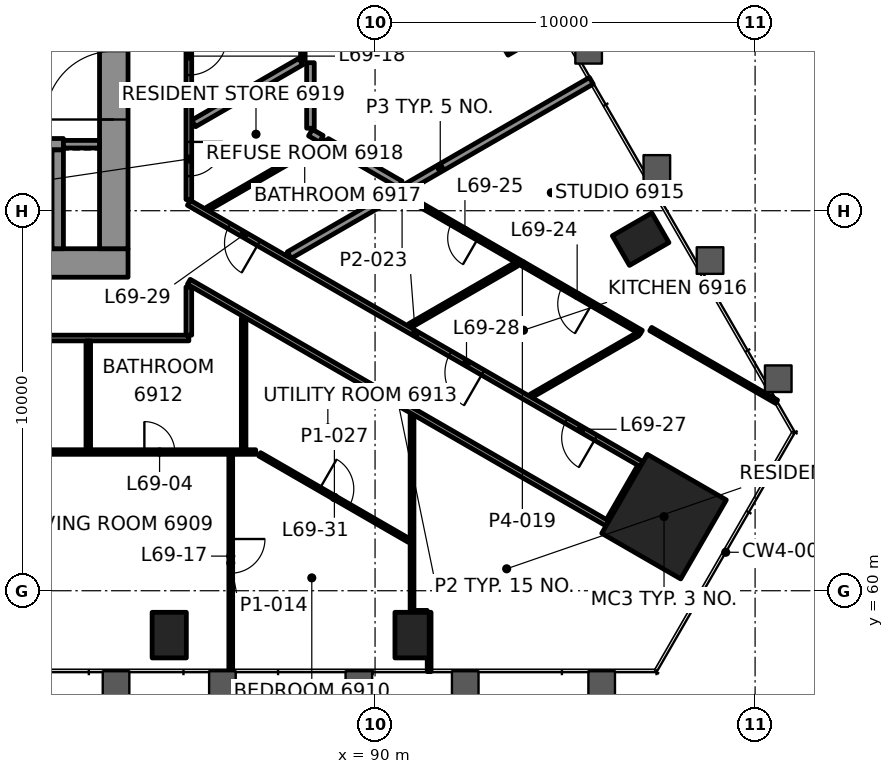
"""IFC4 building model, lengths in metres.
Left out: names, types, materials, properties, quantities, classifications, styles, units other than length and angle.
Written with IfcOpenShell. Run it as: python <this file> out.ifc"""

import sys

from ifc_helpers import new_model, si_unit, direction, frame, frame_2d, origin, origin_2d, place, context, subcontext, project, spatial, rectangle, hollow_rectangle, extrude, element, fill, save


model = new_model("IFC4")
c1 = context("Model", 3, precision=1e-05, world=origin(), true_north=direction((0.0, 1.0)))
c2 = subcontext(c1, "Body", "Model", "MODEL_VIEW")
j1 = project(units=[si_unit("LENGTHUNIT", "METRE"), si_unit("PLANEANGLEUNIT", "RADIAN")], contexts=[c1])
p1 = place(None, origin())
s1 = spatial("IfcSite", under=j1, at=p1, CompositionType="ELEMENT")
p2 = place(p1, origin())
s2 = spatial("IfcBuilding", under=s1, at=p2, CompositionType="ELEMENT")
p3 = place(p2, frame((0.0, 0.0, 288.1)))
s3 = spatial("IfcBuildingStorey", under=s2, at=p3, CompositionType="ELEMENT", Elevation=288.1)
p4 = place(p3, frame((97.604, 61.95, 0.0), z_axis=(0.0, 0.0, 1.0), x_axis=(0.5, 0.866025403784, 0.0)))
e1 = element("IfcColumn", 1, at=p4, inside=s3, PredefinedType="COLUMN", context=c2, shape_type="SweptSolid", body=[
    extrude(rectangle(XDim=2.4, YDim=2.4, at=origin_2d()), origin(), (0.0, 0.0, 1.0), 3.5),
])
for number, where, z_axis, x_axis in (
    (2, (84.584, 58.832, -0.0), (0.0, 0.0, 1.0), (1.0, 0.0, 0.0)),
    (3, (90.973, 58.832, -0.0), (0.0, 0.0, 1.0), (1.0, 0.0, 0.0)),
    (4, (96.989, 69.251, -0.0), (0.0, 0.0, 1.0), (-0.5, 0.866, 0.0)),
    (5, (93.794, 74.784, -0.0), (0.0, 0.0, 1.0), (-0.5, 0.866, 0.0)),
):
    element("IfcColumn", number, at=place(p3, frame(where, z_axis=z_axis, x_axis=x_axis)), inside=s3, PredefinedType="COLUMN", context=c2, shape_type="SweptSolid", body=[
        extrude(hollow_rectangle(XDim=0.9, YDim=1.2, WallThickness=0.06, at=origin_2d()), origin(), (0.0, 0.0, 1.0), 3.5),
    ])
p5 = place(p3, frame((66.5, 68.625, 0.0), z_axis=(0.0, 0.0, 1.0), x_axis=(1.0, 0.0, 0.0)))
e6 = element("IfcWall", 6, at=p5, inside=s3, PredefinedType="SHEAR", context=c2, shape_type="SweptSolid", body=[
    extrude(rectangle(XDim=17.0, YDim=0.75, at=frame_2d((8.5, 0.0))), origin(), (0.0, 0.0, 1.0), 3.3),
])
p6 = place(p5, frame((2.7, 0.0, 0.0)))
e7 = element("IfcOpeningElement", 7, at=p6, cuts=e6, PredefinedType="OPENING", context=c2, shape_type="SweptSolid", body=[
    extrude(rectangle(XDim=0.9, YDim=2.1, at=frame_2d((0.45, 1.05))), frame((0.0, 0.385, 0.0), z_axis=(0.0, -1.0, 0.0), x_axis=(1.0, 0.0, 0.0)), (0.0, 0.0, 1.0), 0.77),
])
p7 = place(p3, frame((83.125, 69.0, 0.0), z_axis=(0.0, 0.0, 1.0), x_axis=(0.0, 1.0, 0.0)))
e8 = element("IfcWall", 8, at=p7, inside=s3, PredefinedType="SHEAR", context=c2, shape_type="SweptSolid", body=[
    extrude(rectangle(XDim=12.0, YDim=0.75, at=frame_2d((6.0, 0.0))), origin(), (0.0, 0.0, 1.0), 3.3),
])
p8 = place(p7, frame((3.4, 0.0, 0.0)))
e9 = element("IfcOpeningElement", 9, at=p8, cuts=e8, PredefinedType="OPENING", context=c2, shape_type="SweptSolid", body=[
    extrude(rectangle(XDim=1.8, YDim=2.1, at=frame_2d((0.9, 1.05))), frame((0.0, 0.385, 0.0), z_axis=(0.0, -1.0, 0.0), x_axis=(1.0, 0.0, 0.0)), (0.0, 0.0, 1.0), 0.77),
])
p9 = place(p3, frame((70.3, 71.75, 0.0), z_axis=(0.0, 0.0, 1.0), x_axis=(1.0, 0.0, 0.0)))
e10 = element("IfcWall", 10, at=p9, inside=s3, PredefinedType="SHEAR", context=c2, shape_type="SweptSolid", body=[
    extrude(rectangle(XDim=11.5, YDim=0.3, at=frame_2d((5.75, 0.0))), origin(), (0.0, 0.0, 1.0), 3.3),
])
p10 = place(p9, frame((1.0, 0.0, 0.0)))
e11 = element("IfcOpeningElement", 11, at=p10, cuts=e10, PredefinedType="OPENING", context=c2, shape_type="SweptSolid", body=[
    extrude(rectangle(XDim=1.1, YDim=2.1, at=frame_2d((0.55, 1.05))), frame((0.0, 0.16, 0.0), z_axis=(0.0, -1.0, 0.0), x_axis=(1.0, 0.0, 0.0)), (0.0, 0.0, 1.0), 0.32),
])
p11 = place(p9, frame((3.8, 0.0, 0.0)))
e12 = element("IfcOpeningElement", 12, at=p11, cuts=e10, PredefinedType="OPENING", context=c2, shape_type="SweptSolid", body=[
    extrude(rectangle(XDim=1.1, YDim=2.1, at=frame_2d((0.55, 1.05))), frame((0.0, 0.16, 0.0), z_axis=(0.0, -1.0, 0.0), x_axis=(1.0, 0.0, 0.0)), (0.0, 0.0, 1.0), 0.32),
])
p12 = place(p9, frame((6.6, 0.0, 0.0)))
e13 = element("IfcOpeningElement", 13, at=p12, cuts=e10, PredefinedType="OPENING", context=c2, shape_type="SweptSolid", body=[
    extrude(rectangle(XDim=1.1, YDim=2.1, at=frame_2d((0.55, 1.05))), frame((0.0, 0.16, 0.0), z_axis=(0.0, -1.0, 0.0), x_axis=(1.0, 0.0, 0.0)), (0.0, 0.0, 1.0), 0.32),
])
p13 = place(p9, frame((9.4, 0.0, 0.0)))
e14 = element("IfcOpeningElement", 14, at=p13, cuts=e10, PredefinedType="OPENING", context=c2, shape_type="SweptSolid", body=[
    extrude(rectangle(XDim=1.1, YDim=2.1, at=frame_2d((0.55, 1.05))), frame((0.0, 0.16, 0.0), z_axis=(0.0, -1.0, 0.0), x_axis=(1.0, 0.0, 0.0)), (0.0, 0.0, 1.0), 0.32),
])
p14 = place(p3, frame((81.65, 69.0, 0.0), z_axis=(0.0, 0.0, 1.0), x_axis=(0.0, 1.0, 0.0)))
e15 = element("IfcWall", 15, at=p14, inside=s3, PredefinedType="SHEAR", context=c2, shape_type="SweptSolid", body=[
    extrude(rectangle(XDim=2.6, YDim=0.3, at=frame_2d((1.3, 0.0))), origin(), (0.0, 0.0, 1.0), 3.3),
])
p15 = place(p3, frame((91.023, 59.432, 0.0), z_axis=(0.0, 0.0, 1.0), x_axis=(1.0, 0.0, 0.0)))
e16 = element("IfcWall", 16, at=p15, inside=s3, PredefinedType="PARTITIONING", context=c2, shape_type="SweptSolid", body=[
    extrude(rectangle(XDim=0.349, YDim=0.1, at=frame_2d((0.175, 0.0))), origin(), (0.0, 0.0, 1.0), 2.7),
])
p16 = place(p3, frame((73.935, 63.65, 0.0), z_axis=(0.0, 0.0, 1.0), x_axis=(1.0, 0.0, 0.0)))
e17 = element("IfcWall", 17, at=p16, inside=s3, PredefinedType="PARTITIONING", context=c2, shape_type="SweptSolid", body=[
    extrude(rectangle(XDim=12.924, YDim=0.12, at=frame_2d((6.462, 0.0))), origin(), (0.0, 0.0, 1.0), 2.7),
])
p17 = place(p16, frame((6.197, 0.0, 0.0)))
e18 = element("IfcOpeningElement", 18, at=p17, cuts=e17, PredefinedType="OPENING", context=c2, shape_type="SweptSolid", body=[
    extrude(rectangle(XDim=0.9, YDim=2.1, at=frame_2d((0.45, 1.05))), frame((0.0, 0.07, 0.0), z_axis=(0.0, -1.0, 0.0), x_axis=(1.0, 0.0, 0.0)), (0.0, 0.0, 1.0), 0.14),
])
p18 = place(p16, frame((9.995, 0.0, 0.0)))
e19 = element("IfcOpeningElement", 19, at=p18, cuts=e17, PredefinedType="OPENING", context=c2, shape_type="SweptSolid", body=[
    extrude(rectangle(XDim=0.8, YDim=2.1, at=frame_2d((0.4, 1.05))), frame((0.0, 0.07, 0.0), z_axis=(0.0, -1.0, 0.0), x_axis=(1.0, 0.0, 0.0)), (0.0, 0.0, 1.0), 0.14),
])
p19 = place(p3, frame((85.1, 66.65, 0.0), z_axis=(0.0, 0.0, 1.0), x_axis=(-1.0, 0.0, 0.0)))
e20 = element("IfcWall", 20, at=p19, inside=s3, PredefinedType="PARTITIONING", context=c2, shape_type="SweptSolid", body=[
    extrude(rectangle(XDim=20.2, YDim=0.15, at=frame_2d((10.1, 0.0))), origin(), (0.0, 0.0, 1.0), 2.7),
])
p20 = place(p19, frame((6.405, 0.0, 0.0)))
e21 = element("IfcOpeningElement", 21, at=p20, cuts=e20, PredefinedType="OPENING", context=c2, shape_type="SweptSolid", body=[
    extrude(rectangle(XDim=1.0, YDim=2.1, at=frame_2d((0.5, 1.05))), frame((0.0, 0.085, 0.0), z_axis=(0.0, -1.0, 0.0), x_axis=(1.0, 0.0, 0.0)), (0.0, 0.0, 1.0), 0.17),
])
p21 = place(p19, frame((12.845, 0.0, 0.0)))
e22 = element("IfcOpeningElement", 22, at=p21, cuts=e20, PredefinedType="OPENING", context=c2, shape_type="SweptSolid", body=[
    extrude(rectangle(XDim=0.9, YDim=2.1, at=frame_2d((0.45, 1.05))), frame((0.0, 0.085, 0.0), z_axis=(0.0, -1.0, 0.0), x_axis=(1.0, 0.0, 0.0)), (0.0, 0.0, 1.0), 0.17),
])
p22 = place(p3, frame((94.104, 65.126, 0.0), z_axis=(0.0, 0.0, 1.0), x_axis=(0.866000336211, 0.500043415797, 0.0)))
e23 = element("IfcWall", 23, at=p22, inside=s3, PredefinedType="PARTITIONING", context=c2, shape_type="SweptSolid", body=[
    extrude(rectangle(XDim=3.248, YDim=0.1, at=frame_2d((1.624, 0.0))), origin(), (0.0, 0.0, 1.0), 2.7),
])
p23 = place(p3, frame((90.918, 66.975, 0.0), z_axis=(0.0, 0.0, 1.0), x_axis=(0.86605210011, 0.499953757757, 0.0)))
e24 = element("IfcWall", 24, at=p23, inside=s3, PredefinedType="PARTITIONING", context=c2, shape_type="SweptSolid", body=[
    extrude(rectangle(XDim=3.228, YDim=0.12, at=frame_2d((1.614, 0.0))), origin(), (0.0, 0.0, 1.0), 2.7),
])
p24 = place(p3, frame((87.741, 68.83, 0.0), z_axis=(0.0, 0.0, 1.0), x_axis=(0.866026579827, 0.499997963029, 0.0)))
e25 = element("IfcWall", 25, at=p24, inside=s3, PredefinedType="PARTITIONING", context=c2, shape_type="SweptSolid", body=[
    extrude(rectangle(XDim=9.179, YDim=0.2, at=frame_2d((4.59, 0.0))), origin(), (0.0, 0.0, 1.0), 2.688),
])
p25 = place(p3, frame((85.585, 70.045, 0.0), z_axis=(0.0, 0.0, 1.0), x_axis=(0.866004928679, 0.500035462246, 0.0)))
e26 = element("IfcWall", 26, at=p25, inside=s3, PredefinedType="PARTITIONING", context=c2, shape_type="SweptSolid", body=[
    extrude(rectangle(XDim=3.578, YDim=0.1, at=frame_2d((1.789, 0.0))), origin(), (0.0, 0.0, 1.0), 2.7),
])
p26 = place(p3, frame((85.227, 72.297, 0.0), z_axis=(0.0, 0.0, 1.0), x_axis=(0.866002113569, 0.500040337666, 0.0)))
e27 = element("IfcWall", 27, at=p26, inside=s3, PredefinedType="PARTITIONING", context=c2, shape_type="SweptSolid", body=[
    extrude(rectangle(XDim=3.258, YDim=0.2, at=frame_2d((1.629, 0.0))), origin(), (0.0, 0.0, 1.0), 2.7),
])
p27 = place(p3, frame((96.153, 61.835, 0.0), z_axis=(0.0, 0.0, 1.0), x_axis=(0.500008692254, 0.866020385251, 0.0)))
e28 = element("IfcWall", 28, at=p27, inside=s3, PredefinedType="PARTITIONING", context=c2, shape_type="SweptSolid", body=[
    extrude(rectangle(XDim=1.649, YDim=0.15, at=frame_2d((0.824, 0.0))), origin(), (0.0, 0.0, 1.0), 2.547),
])
p28 = place(p3, frame((91.423, 57.872, 0.0), z_axis=(0.0, 0.0, 1.0), x_axis=(0.0, 1.0, 0.0)))
e29 = element("IfcWall", 29, at=p28, inside=s3, PredefinedType="PARTITIONING", context=c2, shape_type="SweptSolid", body=[
    extrude(rectangle(XDim=1.559, YDim=0.1, at=frame_2d((0.78, 0.0))), origin(), (0.0, 0.0, 1.0), 2.7),
])
p29 = place(p3, frame((90.973, 59.432, 0.0), z_axis=(0.0, 0.0, 1.0), x_axis=(0.0, 1.0, 0.0)))
e30 = element("IfcWall", 30, at=p29, inside=s3, PredefinedType="PARTITIONING", context=c2, shape_type="SweptSolid", body=[
    extrude(rectangle(XDim=5.19, YDim=0.1, at=frame_2d((2.595, 0.0))), origin(), (0.0, 0.0, 1.0), 2.7),
])
p30 = place(p3, frame((88.3, 72.171, 0.0), z_axis=(0.0, 0.0, 1.0), x_axis=(0.0, 1.0, 0.0)))
e31 = element("IfcWall", 31, at=p30, inside=s3, PredefinedType="PARTITIONING", context=c2, shape_type="SweptSolid", body=[
    extrude(rectangle(XDim=1.724, YDim=0.2, at=frame_2d((0.862, 0.0))), origin(), (0.0, 0.0, 1.0), 2.7),
])
p31 = place(p3, frame((88.1, 81.334, 0.0), z_axis=(0.0, 0.0, 1.0), x_axis=(0.0, -1.0, 0.0)))
e32 = element("IfcWall", 32, at=p31, inside=s3, PredefinedType="PARTITIONING", context=c2, shape_type="SweptSolid", body=[
    extrude(rectangle(XDim=7.378, YDim=0.12, at=frame_2d((3.689, 0.0))), origin(), (0.0, 0.0, 1.0), 2.7),
])
p32 = place(p31, frame((4.982, 0.0, 0.0)))
e33 = element("IfcOpeningElement", 33, at=p32, cuts=e32, PredefinedType="OPENING", context=c2, shape_type="SweptSolid", body=[
    extrude(rectangle(XDim=0.9, YDim=2.1, at=frame_2d((0.45, 1.05))), frame((0.0, 0.07, 0.0), z_axis=(0.0, -1.0, 0.0), x_axis=(1.0, 0.0, 0.0)), (0.0, 0.0, 1.0), 0.14),
])
p33 = place(p3, frame((86.542, 63.71, 0.0), z_axis=(0.0, 0.0, 1.0), x_axis=(0.0, 1.0, 0.0)))
e34 = element("IfcWall", 34, at=p33, inside=s3, PredefinedType="PARTITIONING", context=c2, shape_type="SweptSolid", body=[
    extrude(rectangle(XDim=3.46, YDim=0.12, at=frame_2d((1.73, 0.0))), origin(), (0.0, 0.0, 1.0), 2.547),
])
p34 = place(p3, frame((86.203, 63.59, 0.0), z_axis=(0.0, 0.0, 1.0), x_axis=(0.0, -1.0, 0.0)))
e35 = element("IfcWall", 35, at=p34, inside=s3, PredefinedType="PARTITIONING", context=c2, shape_type="SweptSolid", body=[
    extrude(rectangle(XDim=5.718, YDim=0.1, at=frame_2d((2.859, 0.0))), origin(), (0.0, 0.0, 1.0), 2.7),
])
p35 = place(p34, frame((2.229, 0.0, 0.0)))
e36 = element("IfcOpeningElement", 36, at=p35, cuts=e35, PredefinedType="OPENING", context=c2, shape_type="SweptSolid", body=[
    extrude(rectangle(XDim=0.9, YDim=2.1, at=frame_2d((0.45, 1.05))), frame((0.0, 0.06, 0.0), z_axis=(0.0, -1.0, 0.0), x_axis=(1.0, 0.0, 0.0)), (0.0, 0.0, 1.0), 0.12),
])
p36 = place(p3, frame((85.1, 66.725, 0.0), z_axis=(0.0, 0.0, 1.0), x_axis=(0.0, 1.0, 0.0)))
e37 = element("IfcWall", 37, at=p36, inside=s3, PredefinedType="PARTITIONING", context=c2, shape_type="SweptSolid", body=[
    extrude(rectangle(XDim=1.268, YDim=0.15, at=frame_2d((0.634, 0.0))), origin(), (0.0, 0.0, 1.0), 2.547),
])
p37 = place(p3, frame((85.1, 83.348, 0.0), z_axis=(0.0, 0.0, 1.0), x_axis=(0.0, -1.0, 0.0)))
e38 = element("IfcWall", 38, at=p37, inside=s3, PredefinedType="PARTITIONING", context=c2, shape_type="SweptSolid", body=[
    extrude(rectangle(XDim=13.053, YDim=0.15, at=frame_2d((6.527, 0.0))), origin(), (0.0, 0.0, 1.0), 2.7),
])
p38 = place(p37, frame((8.78, 0.0, 0.0)))
e39 = element("IfcOpeningElement", 39, at=p38, cuts=e38, PredefinedType="OPENING", context=c2, shape_type="SweptSolid", body=[
    extrude(rectangle(XDim=1.0, YDim=2.1, at=frame_2d((0.5, 1.05))), frame((0.0, 0.085, 0.0), z_axis=(0.0, -1.0, 0.0), x_axis=(1.0, 0.0, 0.0)), (0.0, 0.0, 1.0), 0.17),
])
p39 = place(p37, frame((11.537, 0.0, 0.0)))
e40 = element("IfcOpeningElement", 40, at=p39, cuts=e38, PredefinedType="OPENING", context=c2, shape_type="SweptSolid", body=[
    extrude(rectangle(XDim=0.9, YDim=2.1, at=frame_2d((0.45, 1.05))), frame((0.0, 0.085, 0.0), z_axis=(0.0, -1.0, 0.0), x_axis=(1.0, 0.0, 0.0)), (0.0, 0.0, 1.0), 0.17),
])
p40 = place(p3, frame((82.454, 63.71, 0.0), z_axis=(0.0, 0.0, 1.0), x_axis=(0.0, 1.0, 0.0)))
e41 = element("IfcWall", 41, at=p40, inside=s3, PredefinedType="PARTITIONING", context=c2, shape_type="SweptSolid", body=[
    extrude(rectangle(XDim=2.865, YDim=0.12, at=frame_2d((1.433, 0.0))), origin(), (0.0, 0.0, 1.0), 2.7),
])
p41 = place(p3, frame((100.566, 64.974, 0.0), z_axis=(0.0, 0.0, 1.0), x_axis=(-0.8660389038, 0.499976616558, 0.0)))
e42 = element("IfcWall", 42, at=p41, inside=s3, PredefinedType="PARTITIONING", context=c2, shape_type="SweptSolid", body=[
    extrude(rectangle(XDim=3.825, YDim=0.1, at=frame_2d((1.913, 0.0))), origin(), (0.0, 0.0, 1.0), 2.7),
])
p42 = place(p3, frame((90.662, 70.692, 0.0), z_axis=(0.0, 0.0, 1.0), x_axis=(-0.866034963436, 0.499983441833, 0.0)))
e43 = element("IfcWall", 43, at=p42, inside=s3, PredefinedType="PARTITIONING", context=c2, shape_type="SweptSolid", body=[
    extrude(rectangle(XDim=2.24, YDim=0.2, at=frame_2d((1.12, 0.0))), origin(), (0.0, 0.0, 1.0), 2.7),
])
p43 = place(p3, frame((97.003, 66.8, 0.0), z_axis=(0.0, 0.0, 1.0), x_axis=(-0.866012764826, 0.500021890679, 0.0)))
e44 = element("IfcWall", 44, at=p43, inside=s3, PredefinedType="PARTITIONING", context=c2, shape_type="SweptSolid", body=[
    extrude(rectangle(XDim=7.222, YDim=0.12, at=frame_2d((3.611, 0.0))), origin(), (0.0, 0.0, 1.0), 2.7),
])
p44 = place(p43, frame((1.496, 0.0, 0.0)))
e45 = element("IfcOpeningElement", 45, at=p44, cuts=e44, PredefinedType="OPENING", context=c2, shape_type="SweptSolid", body=[
    extrude(rectangle(XDim=0.9, YDim=2.1, at=frame_2d((0.45, 1.05))), frame((0.0, 0.07, 0.0), z_axis=(0.0, -1.0, 0.0), x_axis=(1.0, 0.0, 0.0)), (0.0, 0.0, 1.0), 0.14),
])
p45 = place(p43, frame((4.956, 0.0, 0.0)))
e46 = element("IfcOpeningElement", 46, at=p45, cuts=e44, PredefinedType="OPENING", context=c2, shape_type="SweptSolid", body=[
    extrude(rectangle(XDim=0.8, YDim=2.1, at=frame_2d((0.4, 1.05))), frame((0.0, 0.07, 0.0), z_axis=(0.0, -1.0, 0.0), x_axis=(1.0, 0.0, 0.0)), (0.0, 0.0, 1.0), 0.14),
])
p46 = place(p3, frame((97.014, 63.329, 0.0), z_axis=(0.0, 0.0, 1.0), x_axis=(-0.866023045711, 0.500004084281, 0.0)))
e47 = element("IfcWall", 47, at=p46, inside=s3, PredefinedType="PARTITIONING", context=c2, shape_type="SweptSolid", body=[
    extrude(rectangle(XDim=13.757, YDim=0.15, at=frame_2d((6.879, 0.0))), origin(), (0.0, 0.0, 1.0), 2.7),
])
p47 = place(p46, frame((1.39, 0.0, 0.0)))
e48 = element("IfcOpeningElement", 48, at=p47, cuts=e47, PredefinedType="OPENING", context=c2, shape_type="SweptSolid", body=[
    extrude(rectangle(XDim=0.9, YDim=2.1, at=frame_2d((0.45, 1.05))), frame((0.0, 0.085, 0.0), z_axis=(0.0, -1.0, 0.0), x_axis=(1.0, 0.0, 0.0)), (0.0, 0.0, 1.0), 0.17),
])
p48 = place(p46, frame((4.821, 0.0, 0.0)))
e49 = element("IfcOpeningElement", 49, at=p48, cuts=e47, PredefinedType="OPENING", context=c2, shape_type="SweptSolid", body=[
    extrude(rectangle(XDim=1.0, YDim=2.1, at=frame_2d((0.5, 1.05))), frame((0.0, 0.085, 0.0), z_axis=(0.0, -1.0, 0.0), x_axis=(1.0, 0.0, 0.0)), (0.0, 0.0, 1.0), 0.17),
])
p49 = place(p46, frame((11.634, 0.0, 0.0)))
e50 = element("IfcOpeningElement", 50, at=p49, cuts=e47, PredefinedType="OPENING", context=c2, shape_type="SweptSolid", body=[
    extrude(rectangle(XDim=0.9, YDim=2.1, at=frame_2d((0.45, 1.05))), frame((0.0, 0.085, 0.0), z_axis=(0.0, -1.0, 0.0), x_axis=(1.0, 0.0, 0.0)), (0.0, 0.0, 1.0), 0.17),
])
p50 = place(p3, frame((96.114, 61.771, 0.0), z_axis=(0.0, 0.0, 1.0), x_axis=(-0.866021912989, 0.500006046186, 0.0)))
e51 = element("IfcWall", 51, at=p50, inside=s3, PredefinedType="PARTITIONING", context=c2, shape_type="SweptSolid", body=[
    extrude(rectangle(XDim=12.718, YDim=0.15, at=frame_2d((6.359, 0.0))), origin(), (0.0, 0.0, 1.0), 2.547),
])
p51 = place(p3, frame((86.963, 63.59, 0.0), z_axis=(0.0, 0.0, 1.0), x_axis=(0.866028993663, -0.499993782096, 0.0)))
e52 = element("IfcWall", 52, at=p51, inside=s3, PredefinedType="PARTITIONING", context=c2, shape_type="SweptSolid", body=[
    extrude(rectangle(XDim=4.543, YDim=0.1, at=frame_2d((2.272, 0.0))), origin(), (0.0, 0.0, 1.0), 2.7),
])
p52 = place(p51, frame((1.822, 0.0, 0.0)))
e53 = element("IfcOpeningElement", 53, at=p52, cuts=e52, PredefinedType="OPENING", context=c2, shape_type="SweptSolid", body=[
    extrude(rectangle(XDim=0.9, YDim=2.1, at=frame_2d((0.45, 1.05))), frame((0.0, 0.06, 0.0), z_axis=(0.0, -1.0, 0.0), x_axis=(1.0, 0.0, 0.0)), (0.0, 0.0, 1.0), 0.12),
])
p53 = place(p3, frame((88.584, 71.892, 0.0), z_axis=(0.0, 0.0, 1.0), x_axis=(-0.865987003449, 0.500066505434, 0.0)))
e54 = element("IfcWall", 54, at=p53, inside=s3, PredefinedType="PARTITIONING", context=c2, shape_type="SweptSolid", body=[
    extrude(rectangle(XDim=0.328, YDim=0.2, at=frame_2d((0.164, 0.0))), origin(), (0.0, 0.0, 1.0), 2.7),
])
p54 = place(p3, frame((81.8, 71.75, 0.0), z_axis=(0.0, 0.0, 1.0), x_axis=(1.0, 0.0, 0.0)))
e55 = element("IfcWall", 55, at=p54, inside=s3, PredefinedType="PARTITIONING", context=c2, shape_type="SweptSolid", body=[
    extrude(rectangle(XDim=0.95, YDim=0.2, at=frame_2d((0.475, 0.0))), origin(), (0.0, 0.0, 1.0), 3.3),
])
p55 = place(p18, origin())
e56 = element("IfcDoor", 56, at=p55, inside=s3, OperationType="SINGLE_SWING_LEFT", PredefinedType="DOOR", context=c2, shape_type="SweptSolid", body=[
    extrude(rectangle(XDim=0.8, YDim=2.1, at=frame_2d((0.4, 1.05))), frame((0.0, 0.025, 0.0), z_axis=(0.0, -1.0, 0.0), x_axis=(1.0, 0.0, 0.0)), (0.0, 0.0, 1.0), 0.05),
])
fill(e19, e56)
p56 = place(p35, origin())
e57 = element("IfcDoor", 57, at=p56, inside=s3, OperationType="SINGLE_SWING_LEFT", PredefinedType="DOOR", context=c2, shape_type="SweptSolid", body=[
    extrude(rectangle(XDim=0.9, YDim=2.1, at=frame_2d((0.45, 1.05))), frame((0.0, 0.025, 0.0), z_axis=(0.0, -1.0, 0.0), x_axis=(1.0, 0.0, 0.0)), (0.0, 0.0, 1.0), 0.05),
])
fill(e36, e57)
p57 = place(p38, origin())
e58 = element("IfcDoor", 58, at=p57, inside=s3, OperationType="SINGLE_SWING_LEFT", PredefinedType="DOOR", context=c2, shape_type="SweptSolid", body=[
    extrude(rectangle(XDim=1.0, YDim=2.1, at=frame_2d((0.5, 1.05))), frame((0.0, 0.025, 0.0), z_axis=(0.0, -1.0, 0.0), x_axis=(1.0, 0.0, 0.0)), (0.0, 0.0, 1.0), 0.05),
])
fill(e39, e58)
p58 = place(p39, origin())
e59 = element("IfcDoor", 59, at=p58, inside=s3, OperationType="SINGLE_SWING_LEFT", PredefinedType="DOOR", context=c2, shape_type="SweptSolid", body=[
    extrude(rectangle(XDim=0.9, YDim=2.1, at=frame_2d((0.45, 1.05))), frame((0.0, 0.025, 0.0), z_axis=(0.0, -1.0, 0.0), x_axis=(1.0, 0.0, 0.0)), (0.0, 0.0, 1.0), 0.05),
])
fill(e40, e59)
p59 = place(p44, origin())
e60 = element("IfcDoor", 60, at=p59, inside=s3, OperationType="SINGLE_SWING_RIGHT", PredefinedType="DOOR", context=c2, shape_type="SweptSolid", body=[
    extrude(rectangle(XDim=0.9, YDim=2.1, at=frame_2d((0.45, 1.05))), frame((0.0, 0.025, 0.0), z_axis=(0.0, -1.0, 0.0), x_axis=(1.0, 0.0, 0.0)), (0.0, 0.0, 1.0), 0.05),
])
fill(e45, e60)
p60 = place(p45, origin())
e61 = element("IfcDoor", 61, at=p60, inside=s3, OperationType="SINGLE_SWING_RIGHT", PredefinedType="DOOR", context=c2, shape_type="SweptSolid", body=[
    extrude(rectangle(XDim=0.8, YDim=2.1, at=frame_2d((0.4, 1.05))), frame((0.0, 0.025, 0.0), z_axis=(0.0, -1.0, 0.0), x_axis=(1.0, 0.0, 0.0)), (0.0, 0.0, 1.0), 0.05),
])
fill(e46, e61)
p61 = place(p47, origin())
e62 = element("IfcDoor", 62, at=p61, inside=s3, OperationType="SINGLE_SWING_LEFT", PredefinedType="DOOR", context=c2, shape_type="SweptSolid", body=[
    extrude(rectangle(XDim=0.9, YDim=2.1, at=frame_2d((0.45, 1.05))), frame((0.0, 0.025, 0.0), z_axis=(0.0, -1.0, 0.0), x_axis=(1.0, 0.0, 0.0)), (0.0, 0.0, 1.0), 0.05),
])
fill(e48, e62)
p62 = place(p48, origin())
e63 = element("IfcDoor", 63, at=p62, inside=s3, OperationType="SINGLE_SWING_LEFT", PredefinedType="DOOR", context=c2, shape_type="SweptSolid", body=[
    extrude(rectangle(XDim=1.0, YDim=2.1, at=frame_2d((0.5, 1.05))), frame((0.0, 0.025, 0.0), z_axis=(0.0, -1.0, 0.0), x_axis=(1.0, 0.0, 0.0)), (0.0, 0.0, 1.0), 0.05),
])
fill(e49, e63)
p63 = place(p49, origin())
e64 = element("IfcDoor", 64, at=p63, inside=s3, OperationType="SINGLE_SWING_LEFT", PredefinedType="DOOR", context=c2, shape_type="SweptSolid", body=[
    extrude(rectangle(XDim=0.9, YDim=2.1, at=frame_2d((0.45, 1.05))), frame((0.0, 0.025, 0.0), z_axis=(0.0, -1.0, 0.0), x_axis=(1.0, 0.0, 0.0)), (0.0, 0.0, 1.0), 0.05),
])
fill(e50, e64)
p64 = place(p52, origin())
e65 = element("IfcDoor", 65, at=p64, inside=s3, OperationType="SINGLE_SWING_LEFT", PredefinedType="DOOR", context=c2, shape_type="SweptSolid", body=[
    extrude(rectangle(XDim=0.9, YDim=2.1, at=frame_2d((0.45, 1.05))), frame((0.0, 0.025, 0.0), z_axis=(0.0, -1.0, 0.0), x_axis=(1.0, 0.0, 0.0)), (0.0, 0.0, 1.0), 0.05),
])
fill(e53, e65)
p65 = place(p8, origin())
e66 = element("IfcDoor", 66, at=p65, inside=s3, OperationType="SINGLE_SWING_LEFT", PredefinedType="DOOR", context=c2, shape_type="SweptSolid", body=[
    extrude(rectangle(XDim=1.8, YDim=2.1, at=frame_2d((0.9, 1.05))), frame((0.0, 0.095, 0.0), z_axis=(0.0, -1.0, 0.0), x_axis=(1.0, 0.0, 0.0)), (0.0, 0.0, 1.0), 0.19),
])
fill(e9, e66)
save(model, sys.argv[1])
